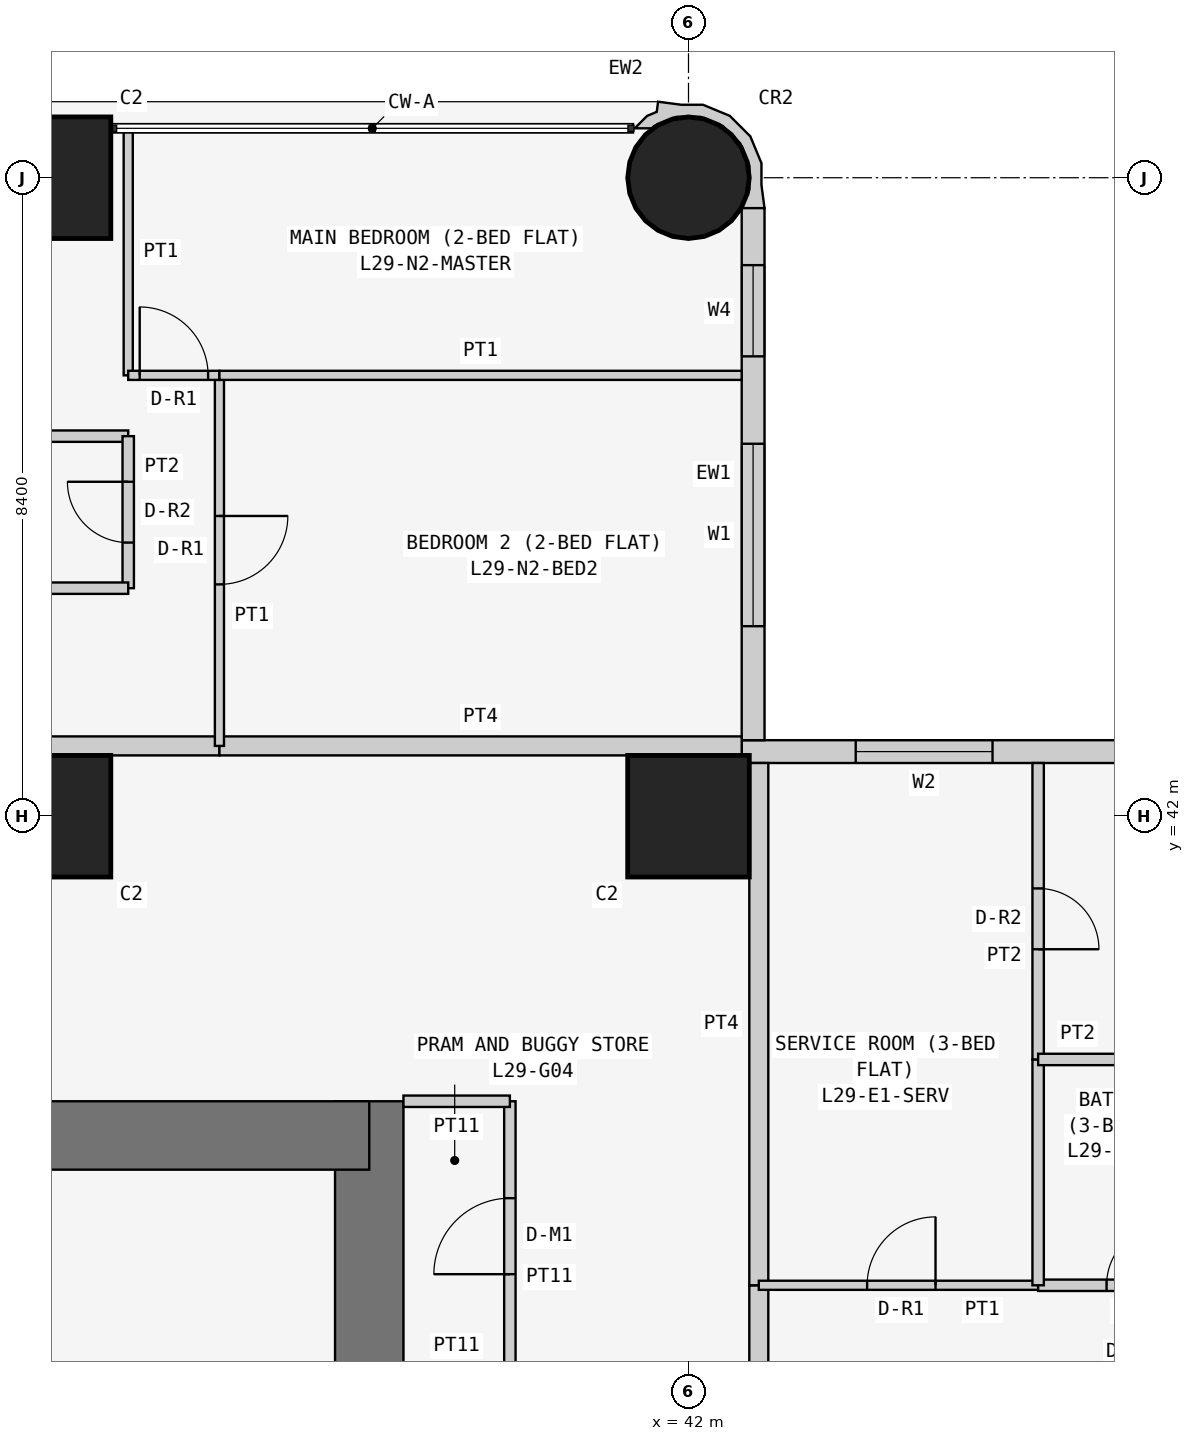
"""IFC4 building model, lengths in metres.
Left out: names, types, materials, properties, quantities, classifications, styles, units other than length and angle.
Written with IfcOpenShell. Run it as: python <this file> out.ifc"""

import sys

from ifc_helpers import new_model, si_unit, direction, frame, frame_2d, origin, origin_2d, place, context, subcontext, project, spatial, polyline, rectangle, circle, outline, extrude, element, fill, save


model = new_model("IFC4")
c1 = context("Model", 3, precision=1e-05, world=origin(), true_north=direction((0.0, 1.0)))
c2 = subcontext(c1, "Body", "Model", "MODEL_VIEW")
j1 = project(units=[si_unit("LENGTHUNIT", "METRE"), si_unit("PLANEANGLEUNIT", "RADIAN")], contexts=[c1])
p1 = place(None, origin())
s1 = spatial("IfcSite", under=j1, at=p1, CompositionType="ELEMENT")
p2 = place(p1, origin())
s2 = spatial("IfcBuilding", under=s1, at=p2, CompositionType="ELEMENT")
p3 = place(p2, frame((0.0, 0.0, 116.1)))
s3 = spatial("IfcBuildingStorey", under=s2, at=p3, CompositionType="ELEMENT", Elevation=116.1)
for number, where, z_axis, x_axis in (
    (1, (33.6, 42.0, 0.0), (0.0, 0.0, 1.0), (1.0, 0.0, 0.0)),
    (2, (33.6, 50.4, 0.0), (0.0, 0.0, 1.0), (1.0, 0.0, 0.0)),
    (3, (42.0, 42.0, 0.0), (0.0, 0.0, 1.0), (1.0, 0.0, 0.0)),
):
    element("IfcColumn", number, at=place(p3, frame(where, z_axis=z_axis, x_axis=x_axis)), inside=s3, PredefinedType="COLUMN", context=c2, shape_type="SweptSolid", body=[
        extrude(rectangle(XDim=1.6, YDim=1.6, at=origin_2d()), origin(), (0.0, 0.0, 1.0), 3.6),
    ])
p4 = place(p3, frame((42.0, 50.4, 0.0), z_axis=(0.0, 0.0, 1.0), x_axis=(1.0, 0.0, 0.0)))
e4 = element("IfcColumn", 4, at=p4, inside=s3, PredefinedType="COLUMN", context=c2, shape_type="SweptSolid", body=[
    extrude(circle(Radius=0.8, at=origin_2d()), origin(), (0.0, 0.0, 1.0), 3.6),
])
p5 = place(p3, frame((37.8, 21.0, 0.0), z_axis=(0.0, 0.0, 1.0), x_axis=(0.0, 1.0, 0.0)))
e5 = element("IfcWall", 5, at=p5, inside=s3, PredefinedType="SHEAR", context=c2, shape_type="SweptSolid", body=[
    extrude(rectangle(XDim=17.25, YDim=0.9, at=frame_2d((8.625, 0.0))), origin(), (0.0, 0.0, 1.0), 3.6),
])
p6 = place(p5, frame((5.2, 0.0, 0.0)))
e6 = element("IfcOpeningElement", 6, at=p6, cuts=e5, PredefinedType="OPENING", context=c2, shape_type="SweptSolid", body=[
    extrude(rectangle(XDim=1.2, YDim=2.1, at=frame_2d((0.6, 1.05))), frame((0.0, 0.46, 0.0), z_axis=(0.0, -1.0, 0.0), x_axis=(1.0, 0.0, 0.0)), (0.0, 0.0, 1.0), 0.92),
])
p7 = place(p3, frame((37.8, 37.8, 0.0), z_axis=(0.0, 0.0, 1.0), x_axis=(-1.0, 0.0, 0.0)))
e7 = element("IfcWall", 7, at=p7, inside=s3, PredefinedType="SHEAR", context=c2, shape_type="SweptSolid", body=[
    extrude(rectangle(XDim=17.25, YDim=0.9, at=frame_2d((8.625, 0.0))), origin(), (0.0, 0.0, 1.0), 3.6),
])
p8 = place(p3, frame((58.4, 42.85, 0.0), z_axis=(0.0, 0.0, 1.0), x_axis=(-1.0, 0.0, 0.0)))
e8 = element("IfcWall", 8, at=p8, inside=s3, PredefinedType="SOLIDWALL", context=c2, shape_type="SweptSolid", body=[
    extrude(rectangle(XDim=15.7, YDim=0.3, at=frame_2d((7.85, 0.0))), origin(), (0.0, 0.0, 1.0), 3.45),
])
p9 = place(p8, frame((12.4, 0.0, 0.9)))
e9 = element("IfcOpeningElement", 9, at=p9, cuts=e8, PredefinedType="OPENING", context=c2, shape_type="SweptSolid", body=[
    extrude(rectangle(XDim=1.8, YDim=1.5, at=frame_2d((0.9, 0.75))), frame((0.0, 0.16, 0.0), z_axis=(0.0, -1.0, 0.0), x_axis=(1.0, 0.0, 0.0)), (0.0, 0.0, 1.0), 0.32),
])
p10 = place(p8, frame((9.55, 0.0, 1.5)))
e10 = element("IfcOpeningElement", 10, at=p10, cuts=e8, PredefinedType="OPENING", context=c2, shape_type="SweptSolid", body=[
    extrude(rectangle(XDim=0.9, YDim=0.7, at=frame_2d((0.45, 0.35))), frame((0.0, 0.16, 0.0), z_axis=(0.0, -1.0, 0.0), x_axis=(1.0, 0.0, 0.0)), (0.0, 0.0, 1.0), 0.32),
])
p11 = place(p8, frame((5.1, 0.0, 0.9)))
e11 = element("IfcOpeningElement", 11, at=p11, cuts=e8, PredefinedType="OPENING", context=c2, shape_type="SweptSolid", body=[
    extrude(rectangle(XDim=1.8, YDim=1.5, at=frame_2d((0.9, 0.75))), frame((0.0, 0.16, 0.0), z_axis=(0.0, -1.0, 0.0), x_axis=(1.0, 0.0, 0.0)), (0.0, 0.0, 1.0), 0.32),
])
p12 = place(p8, frame((2.0, 0.0, 0.0)))
e12 = element("IfcOpeningElement", 12, at=p12, cuts=e8, PredefinedType="OPENING", context=c2, shape_type="SweptSolid", body=[
    extrude(rectangle(XDim=0.9, YDim=2.4, at=frame_2d((0.45, 1.2))), frame((0.0, 0.16, 0.0), z_axis=(0.0, -1.0, 0.0), x_axis=(1.0, 0.0, 0.0)), (0.0, 0.0, 1.0), 0.32),
])
p13 = place(p8, frame((0.7, 0.0, 0.9)))
e13 = element("IfcOpeningElement", 13, at=p13, cuts=e8, PredefinedType="OPENING", context=c2, shape_type="SweptSolid", body=[
    extrude(rectangle(XDim=1.2, YDim=1.5, at=frame_2d((0.6, 0.75))), frame((0.0, 0.16, 0.0), z_axis=(0.0, -1.0, 0.0), x_axis=(1.0, 0.0, 0.0)), (0.0, 0.0, 1.0), 0.32),
])
p14 = place(p3, frame((42.85, 43.0, 0.0), z_axis=(0.0, 0.0, 1.0), x_axis=(0.0, 1.0, 0.0)))
e14 = element("IfcWall", 14, at=p14, inside=s3, PredefinedType="SOLIDWALL", context=c2, shape_type="SweptSolid", body=[
    extrude(rectangle(XDim=7.0, YDim=0.3, at=frame_2d((3.5, 0.0))), origin(), (0.0, 0.0, 1.0), 3.45),
])
p15 = place(p14, frame((1.5, 0.0, 0.9)))
e15 = element("IfcOpeningElement", 15, at=p15, cuts=e14, PredefinedType="OPENING", context=c2, shape_type="SweptSolid", body=[
    extrude(rectangle(XDim=2.4, YDim=1.5, at=frame_2d((1.2, 0.75))), frame((0.0, 0.16, 0.0), z_axis=(0.0, -1.0, 0.0), x_axis=(1.0, 0.0, 0.0)), (0.0, 0.0, 1.0), 0.32),
])
p16 = place(p14, frame((5.05, 0.0, 0.9)))
e16 = element("IfcOpeningElement", 16, at=p16, cuts=e14, PredefinedType="OPENING", context=c2, shape_type="SweptSolid", body=[
    extrude(rectangle(XDim=1.2, YDim=1.5, at=frame_2d((0.6, 0.75))), frame((0.0, 0.16, 0.0), z_axis=(0.0, -1.0, 0.0), x_axis=(1.0, 0.0, 0.0)), (0.0, 0.0, 1.0), 0.32),
])
p17 = place(p3, frame((42.817, 50.073, 0.0), z_axis=(0.0, 0.0, 1.0), x_axis=(0.343276641956, 0.93923434088, 0.0)))
e17 = element("IfcWall", 17, at=p17, inside=s3, PredefinedType="SOLIDWALL", context=c2, shape_type="SweptSolid", body=[
    extrude(outline(polyline([(0.266, -0.055), (0.535, 0.044), (0.817, 0.302), (0.978, 0.648), (0.994, 1.03), (0.895, 1.3), (0.828, 1.598), (0.697, 1.569), (0.604, 1.67), (0.394, 1.767), (0.471, 1.556), (0.509, 1.539), (0.724, 1.304), (0.833, 1.005), (0.82, 0.687), (0.686, 0.397), (0.451, 0.182), (0.152, 0.073), (-0.116, 0.084), (-0.128, 0.078), (-0.146, 0.071), (-0.006, -0.197), (0.266, -0.055)])), origin(), (0.0, 0.0, 1.0), 3.45),
])
p18 = place(p3, frame((39.65, 34.7, 0.0), z_axis=(0.0, 0.0, 1.0), x_axis=(0.0, 1.0, 0.0)))
e18 = element("IfcWall", 18, at=p18, inside=s3, PredefinedType="PARTITIONING", context=c2, shape_type="SweptSolid", body=[
    extrude(rectangle(XDim=3.55, YDim=0.15, at=frame_2d((1.775, 0.0))), origin(), (0.0, 0.0, 1.0), 3.45),
])
p19 = place(p18, frame((1.275, 0.0, 0.0)))
e19 = element("IfcOpeningElement", 19, at=p19, cuts=e18, PredefinedType="OPENING", context=c2, shape_type="SweptSolid", body=[
    extrude(rectangle(XDim=1.0, YDim=2.1, at=frame_2d((0.5, 1.05))), frame((0.0, 0.085, 0.0), z_axis=(0.0, -1.0, 0.0), x_axis=(1.0, 0.0, 0.0)), (0.0, 0.0, 1.0), 0.17),
])
p20 = place(p3, frame((39.65, 38.25, 0.0), z_axis=(0.0, 0.0, 1.0), x_axis=(-1.0, 0.0, 0.0)))
e20 = element("IfcWall", 20, at=p20, inside=s3, PredefinedType="PARTITIONING", context=c2, shape_type="SweptSolid", body=[
    extrude(rectangle(XDim=1.4, YDim=0.15, at=frame_2d((0.7, 0.0))), origin(), (0.0, 0.0, 1.0), 3.45),
])
p21 = place(p3, frame((29.4, 42.925, 0.0), z_axis=(0.0, 0.0, 1.0), x_axis=(1.0, 0.0, 0.0)))
e21 = element("IfcWall", 21, at=p21, inside=s3, PredefinedType="PARTITIONING", context=c2, shape_type="SweptSolid", body=[
    extrude(rectangle(XDim=6.429, YDim=0.25, at=frame_2d((3.215, 0.0))), origin(), (0.0, 0.0, 1.0), 3.45),
])
p22 = place(p21, frame((0.5, 0.0, 0.0)))
e22 = element("IfcOpeningElement", 22, at=p22, cuts=e21, PredefinedType="OPENING", context=c2, shape_type="SweptSolid", body=[
    extrude(rectangle(XDim=1.0, YDim=2.1, at=frame_2d((0.5, 1.05))), frame((0.0, 0.135, 0.0), z_axis=(0.0, -1.0, 0.0), x_axis=(1.0, 0.0, 0.0)), (0.0, 0.0, 1.0), 0.27),
])
p23 = place(p3, frame((35.829, 42.925, 0.0), z_axis=(0.0, 0.0, 1.0), x_axis=(1.0, 0.0, 0.0)))
e23 = element("IfcWall", 23, at=p23, inside=s3, PredefinedType="PARTITIONING", context=c2, shape_type="SweptSolid", body=[
    extrude(rectangle(XDim=6.871, YDim=0.25, at=frame_2d((3.436, 0.0))), origin(), (0.0, 0.0, 1.0), 3.45),
])
p24 = place(p3, frame((42.925, 35.829, 0.0), z_axis=(0.0, 0.0, 1.0), x_axis=(0.0, -1.0, 0.0)))
e24 = element("IfcWall", 24, at=p24, inside=s3, PredefinedType="PARTITIONING", context=c2, shape_type="SweptSolid", body=[
    extrude(rectangle(XDim=1.2, YDim=0.25, at=frame_2d((0.6, 0.0))), origin(), (0.0, 0.0, 1.0), 3.45),
])
p25 = place(p3, frame((42.925, 42.7, 0.0), z_axis=(0.0, 0.0, 1.0), x_axis=(0.0, -1.0, 0.0)))
e25 = element("IfcWall", 25, at=p25, inside=s3, PredefinedType="PARTITIONING", context=c2, shape_type="SweptSolid", body=[
    extrude(rectangle(XDim=6.871, YDim=0.25, at=frame_2d((3.436, 0.0))), origin(), (0.0, 0.0, 1.0), 3.45),
])
p26 = place(p3, frame((29.4, 47.0, 0.0), z_axis=(0.0, 0.0, 1.0), x_axis=(1.0, 0.0, 0.0)))
e26 = element("IfcWall", 26, at=p26, inside=s3, PredefinedType="PARTITIONING", context=c2, shape_type="SweptSolid", body=[
    extrude(rectangle(XDim=5.229, YDim=0.15, at=frame_2d((2.615, 0.0))), origin(), (0.0, 0.0, 1.0), 3.45),
])
p27 = place(p3, frame((34.629, 47.0, 0.0), z_axis=(0.0, 0.0, 1.0), x_axis=(0.0, -1.0, 0.0)))
e27 = element("IfcWall", 27, at=p27, inside=s3, PredefinedType="PARTITIONING", context=c2, shape_type="SweptSolid", body=[
    extrude(rectangle(XDim=2.0, YDim=0.15, at=frame_2d((1.0, 0.0))), origin(), (0.0, 0.0, 1.0), 3.45),
])
p28 = place(p27, frame((0.6, 0.0, 0.0)))
e28 = element("IfcOpeningElement", 28, at=p28, cuts=e27, PredefinedType="OPENING", context=c2, shape_type="SweptSolid", body=[
    extrude(rectangle(XDim=0.8, YDim=2.1, at=frame_2d((0.4, 1.05))), frame((0.0, 0.085, 0.0), z_axis=(0.0, -1.0, 0.0), x_axis=(1.0, 0.0, 0.0)), (0.0, 0.0, 1.0), 0.17),
])
p29 = place(p3, frame((34.629, 45.0, 0.0), z_axis=(0.0, 0.0, 1.0), x_axis=(-1.0, 0.0, 0.0)))
e29 = element("IfcWall", 29, at=p29, inside=s3, PredefinedType="PARTITIONING", context=c2, shape_type="SweptSolid", body=[
    extrude(rectangle(XDim=5.229, YDim=0.15, at=frame_2d((2.615, 0.0))), origin(), (0.0, 0.0, 1.0), 3.45),
])
p30 = place(p3, frame((35.829, 47.8, 0.0), z_axis=(0.0, 0.0, 1.0), x_axis=(0.0, -1.0, 0.0)))
e30 = element("IfcWall", 30, at=p30, inside=s3, PredefinedType="PARTITIONING", context=c2, shape_type="SweptSolid", body=[
    extrude(rectangle(XDim=4.875, YDim=0.12, at=frame_2d((2.438, 0.0))), origin(), (0.0, 0.0, 1.0), 3.45),
])
p31 = place(p30, frame((1.85, 0.0, 0.0)))
e31 = element("IfcOpeningElement", 31, at=p31, cuts=e30, PredefinedType="OPENING", context=c2, shape_type="SweptSolid", body=[
    extrude(rectangle(XDim=0.9, YDim=2.1, at=frame_2d((0.45, 1.05))), frame((0.0, 0.07, 0.0), z_axis=(0.0, -1.0, 0.0), x_axis=(1.0, 0.0, 0.0)), (0.0, 0.0, 1.0), 0.14),
])
p32 = place(p3, frame((34.629, 51.05, 0.0), z_axis=(0.0, 0.0, 1.0), x_axis=(0.0, -1.0, 0.0)))
e32 = element("IfcWall", 32, at=p32, inside=s3, PredefinedType="PARTITIONING", context=c2, shape_type="SweptSolid", body=[
    extrude(rectangle(XDim=3.25, YDim=0.12, at=frame_2d((1.625, 0.0))), origin(), (0.0, 0.0, 1.0), 3.45),
])
p33 = place(p3, frame((34.629, 47.8, 0.0), z_axis=(0.0, 0.0, 1.0), x_axis=(1.0, 0.0, 0.0)))
e33 = element("IfcWall", 33, at=p33, inside=s3, PredefinedType="PARTITIONING", context=c2, shape_type="SweptSolid", body=[
    extrude(rectangle(XDim=1.2, YDim=0.12, at=frame_2d((0.6, 0.0))), origin(), (0.0, 0.0, 1.0), 3.45),
])
p34 = place(p33, frame((0.151, 0.0, 0.0)))
e34 = element("IfcOpeningElement", 34, at=p34, cuts=e33, PredefinedType="OPENING", context=c2, shape_type="SweptSolid", body=[
    extrude(rectangle(XDim=0.9, YDim=2.1, at=frame_2d((0.45, 1.05))), frame((0.0, 0.07, 0.0), z_axis=(0.0, -1.0, 0.0), x_axis=(1.0, 0.0, 0.0)), (0.0, 0.0, 1.0), 0.14),
])
p35 = place(p3, frame((35.829, 47.8, 0.0), z_axis=(0.0, 0.0, 1.0), x_axis=(1.0, 0.0, 0.0)))
e35 = element("IfcWall", 35, at=p35, inside=s3, PredefinedType="PARTITIONING", context=c2, shape_type="SweptSolid", body=[
    extrude(rectangle(XDim=6.871, YDim=0.12, at=frame_2d((3.436, 0.0))), origin(), (0.0, 0.0, 1.0), 3.45),
])
p36 = place(p3, frame((46.6, 35.829, 0.0), z_axis=(0.0, 0.0, 1.0), x_axis=(-1.0, 0.0, 0.0)))
e36 = element("IfcWall", 36, at=p36, inside=s3, PredefinedType="PARTITIONING", context=c2, shape_type="SweptSolid", body=[
    extrude(rectangle(XDim=3.675, YDim=0.12, at=frame_2d((1.837, 0.0))), origin(), (0.0, 0.0, 1.0), 3.45),
])
p37 = place(p36, frame((1.35, 0.0, 0.0)))
e37 = element("IfcOpeningElement", 37, at=p37, cuts=e36, PredefinedType="OPENING", context=c2, shape_type="SweptSolid", body=[
    extrude(rectangle(XDim=0.9, YDim=2.1, at=frame_2d((0.45, 1.05))), frame((0.0, 0.07, 0.0), z_axis=(0.0, -1.0, 0.0), x_axis=(1.0, 0.0, 0.0)), (0.0, 0.0, 1.0), 0.14),
])
p38 = place(p3, frame((49.2, 35.829, 0.0), z_axis=(0.0, 0.0, 1.0), x_axis=(-1.0, 0.0, 0.0)))
e38 = element("IfcWall", 38, at=p38, inside=s3, PredefinedType="PARTITIONING", context=c2, shape_type="SweptSolid", body=[
    extrude(rectangle(XDim=2.6, YDim=0.15, at=frame_2d((1.3, 0.0))), origin(), (0.0, 0.0, 1.0), 3.45),
])
p39 = place(p38, frame((0.9, 0.0, 0.0)))
e39 = element("IfcOpeningElement", 39, at=p39, cuts=e38, PredefinedType="OPENING", context=c2, shape_type="SweptSolid", body=[
    extrude(rectangle(XDim=0.8, YDim=2.1, at=frame_2d((0.4, 1.05))), frame((0.0, 0.085, 0.0), z_axis=(0.0, -1.0, 0.0), x_axis=(1.0, 0.0, 0.0)), (0.0, 0.0, 1.0), 0.17),
])
p40 = place(p3, frame((46.6, 35.829, 0.0), z_axis=(0.0, 0.0, 1.0), x_axis=(0.0, 1.0, 0.0)))
e40 = element("IfcWall", 40, at=p40, inside=s3, PredefinedType="PARTITIONING", context=c2, shape_type="SweptSolid", body=[
    extrude(rectangle(XDim=2.971, YDim=0.15, at=frame_2d((1.485, 0.0))), origin(), (0.0, 0.0, 1.0), 3.45),
])
p41 = place(p3, frame((46.6, 38.8, 0.0), z_axis=(0.0, 0.0, 1.0), x_axis=(0.0, 1.0, 0.0)))
e41 = element("IfcWall", 41, at=p41, inside=s3, PredefinedType="PARTITIONING", context=c2, shape_type="SweptSolid", body=[
    extrude(rectangle(XDim=3.9, YDim=0.15, at=frame_2d((1.95, 0.0))), origin(), (0.0, 0.0, 1.0), 3.45),
])
p42 = place(p41, frame((1.45, 0.0, 0.0)))
e42 = element("IfcOpeningElement", 42, at=p42, cuts=e41, PredefinedType="OPENING", context=c2, shape_type="SweptSolid", body=[
    extrude(rectangle(XDim=0.8, YDim=2.1, at=frame_2d((0.4, 1.05))), frame((0.0, 0.085, 0.0), z_axis=(0.0, -1.0, 0.0), x_axis=(1.0, 0.0, 0.0)), (0.0, 0.0, 1.0), 0.17),
])
p43 = place(p3, frame((49.2, 38.8, 0.0), z_axis=(0.0, 0.0, 1.0), x_axis=(-1.0, 0.0, 0.0)))
e43 = element("IfcWall", 43, at=p43, inside=s3, PredefinedType="PARTITIONING", context=c2, shape_type="SweptSolid", body=[
    extrude(rectangle(XDim=2.6, YDim=0.15, at=frame_2d((1.3, 0.0))), origin(), (0.0, 0.0, 1.0), 3.45),
])
p44 = place(p15, origin())
e44 = element("IfcWindow", 44, at=p44, inside=s3, PartitioningType="SINGLE_PANEL", PredefinedType="WINDOW", context=c2, shape_type="SweptSolid", body=[
    extrude(rectangle(XDim=2.4, YDim=1.5, at=frame_2d((1.2, 0.75))), frame((0.0, 0.03, 0.0), z_axis=(0.0, -1.0, 0.0), x_axis=(1.0, 0.0, 0.0)), (0.0, 0.0, 1.0), 0.06),
])
fill(e15, e44)
p45 = place(p16, origin())
e45 = element("IfcWindow", 45, at=p45, inside=s3, PartitioningType="SINGLE_PANEL", PredefinedType="WINDOW", context=c2, shape_type="SweptSolid", body=[
    extrude(rectangle(XDim=1.2, YDim=1.5, at=frame_2d((0.6, 0.75))), frame((0.0, 0.03, 0.0), z_axis=(0.0, -1.0, 0.0), x_axis=(1.0, 0.0, 0.0)), (0.0, 0.0, 1.0), 0.06),
])
fill(e16, e45)
p46 = place(p9, origin())
e46 = element("IfcWindow", 46, at=p46, inside=s3, PartitioningType="SINGLE_PANEL", PredefinedType="WINDOW", context=c2, shape_type="SweptSolid", body=[
    extrude(rectangle(XDim=1.8, YDim=1.5, at=frame_2d((0.9, 0.75))), frame((0.0, 0.03, 0.0), z_axis=(0.0, -1.0, 0.0), x_axis=(1.0, 0.0, 0.0)), (0.0, 0.0, 1.0), 0.06),
])
fill(e9, e46)
p47 = place(p19, origin())
e47 = element("IfcDoor", 47, at=p47, inside=s3, OperationType="SINGLE_SWING_LEFT", PredefinedType="DOOR", context=c2, shape_type="SweptSolid", body=[
    extrude(rectangle(XDim=1.0, YDim=2.1, at=frame_2d((0.5, 1.05))), frame((0.0, 0.025, 0.0), z_axis=(0.0, -1.0, 0.0), x_axis=(1.0, 0.0, 0.0)), (0.0, 0.0, 1.0), 0.05),
])
fill(e19, e47)
p48 = place(p28, frame((0.8, 0.0, 0.0), z_axis=(0.0, 0.0, 1.0), x_axis=(-1.0, 0.0, 0.0)))
e48 = element("IfcDoor", 48, at=p48, inside=s3, OperationType="SINGLE_SWING_RIGHT", PredefinedType="DOOR", context=c2, shape_type="SweptSolid", body=[
    extrude(rectangle(XDim=0.8, YDim=2.1, at=frame_2d((0.4, 1.05))), frame((0.0, 0.025, 0.0), z_axis=(0.0, -1.0, 0.0), x_axis=(1.0, 0.0, 0.0)), (0.0, 0.0, 1.0), 0.05),
])
fill(e28, e48)
p49 = place(p31, origin())
e49 = element("IfcDoor", 49, at=p49, inside=s3, OperationType="SINGLE_SWING_LEFT", PredefinedType="DOOR", context=c2, shape_type="SweptSolid", body=[
    extrude(rectangle(XDim=0.9, YDim=2.1, at=frame_2d((0.45, 1.05))), frame((0.0, 0.025, 0.0), z_axis=(0.0, -1.0, 0.0), x_axis=(1.0, 0.0, 0.0)), (0.0, 0.0, 1.0), 0.05),
])
fill(e31, e49)
p50 = place(p34, origin())
e50 = element("IfcDoor", 50, at=p50, inside=s3, OperationType="SINGLE_SWING_LEFT", PredefinedType="DOOR", context=c2, shape_type="SweptSolid", body=[
    extrude(rectangle(XDim=0.9, YDim=2.1, at=frame_2d((0.45, 1.05))), frame((0.0, 0.025, 0.0), z_axis=(0.0, -1.0, 0.0), x_axis=(1.0, 0.0, 0.0)), (0.0, 0.0, 1.0), 0.05),
])
fill(e34, e50)
p51 = place(p37, frame((0.9, 0.0, 0.0), z_axis=(0.0, 0.0, 1.0), x_axis=(-1.0, 0.0, 0.0)))
e51 = element("IfcDoor", 51, at=p51, inside=s3, OperationType="SINGLE_SWING_RIGHT", PredefinedType="DOOR", context=c2, shape_type="SweptSolid", body=[
    extrude(rectangle(XDim=0.9, YDim=2.1, at=frame_2d((0.45, 1.05))), frame((0.0, 0.025, 0.0), z_axis=(0.0, -1.0, 0.0), x_axis=(1.0, 0.0, 0.0)), (0.0, 0.0, 1.0), 0.05),
])
fill(e37, e51)
p52 = place(p42, frame((0.8, 0.0, 0.0), z_axis=(0.0, 0.0, 1.0), x_axis=(-1.0, 0.0, 0.0)))
e52 = element("IfcDoor", 52, at=p52, inside=s3, OperationType="SINGLE_SWING_RIGHT", PredefinedType="DOOR", context=c2, shape_type="SweptSolid", body=[
    extrude(rectangle(XDim=0.8, YDim=2.1, at=frame_2d((0.4, 1.05))), frame((0.0, 0.025, 0.0), z_axis=(0.0, -1.0, 0.0), x_axis=(1.0, 0.0, 0.0)), (0.0, 0.0, 1.0), 0.05),
])
fill(e42, e52)
p53 = place(p39, frame((0.8, 0.0, 0.0), z_axis=(0.0, 0.0, 1.0), x_axis=(-1.0, 0.0, 0.0)))
e53 = element("IfcDoor", 53, at=p53, inside=s3, OperationType="SINGLE_SWING_RIGHT", PredefinedType="DOOR", context=c2, shape_type="SweptSolid", body=[
    extrude(rectangle(XDim=0.8, YDim=2.1, at=frame_2d((0.4, 1.05))), frame((0.0, 0.025, 0.0), z_axis=(0.0, -1.0, 0.0), x_axis=(1.0, 0.0, 0.0)), (0.0, 0.0, 1.0), 0.05),
])
fill(e39, e53)
save(model, sys.argv[1])
